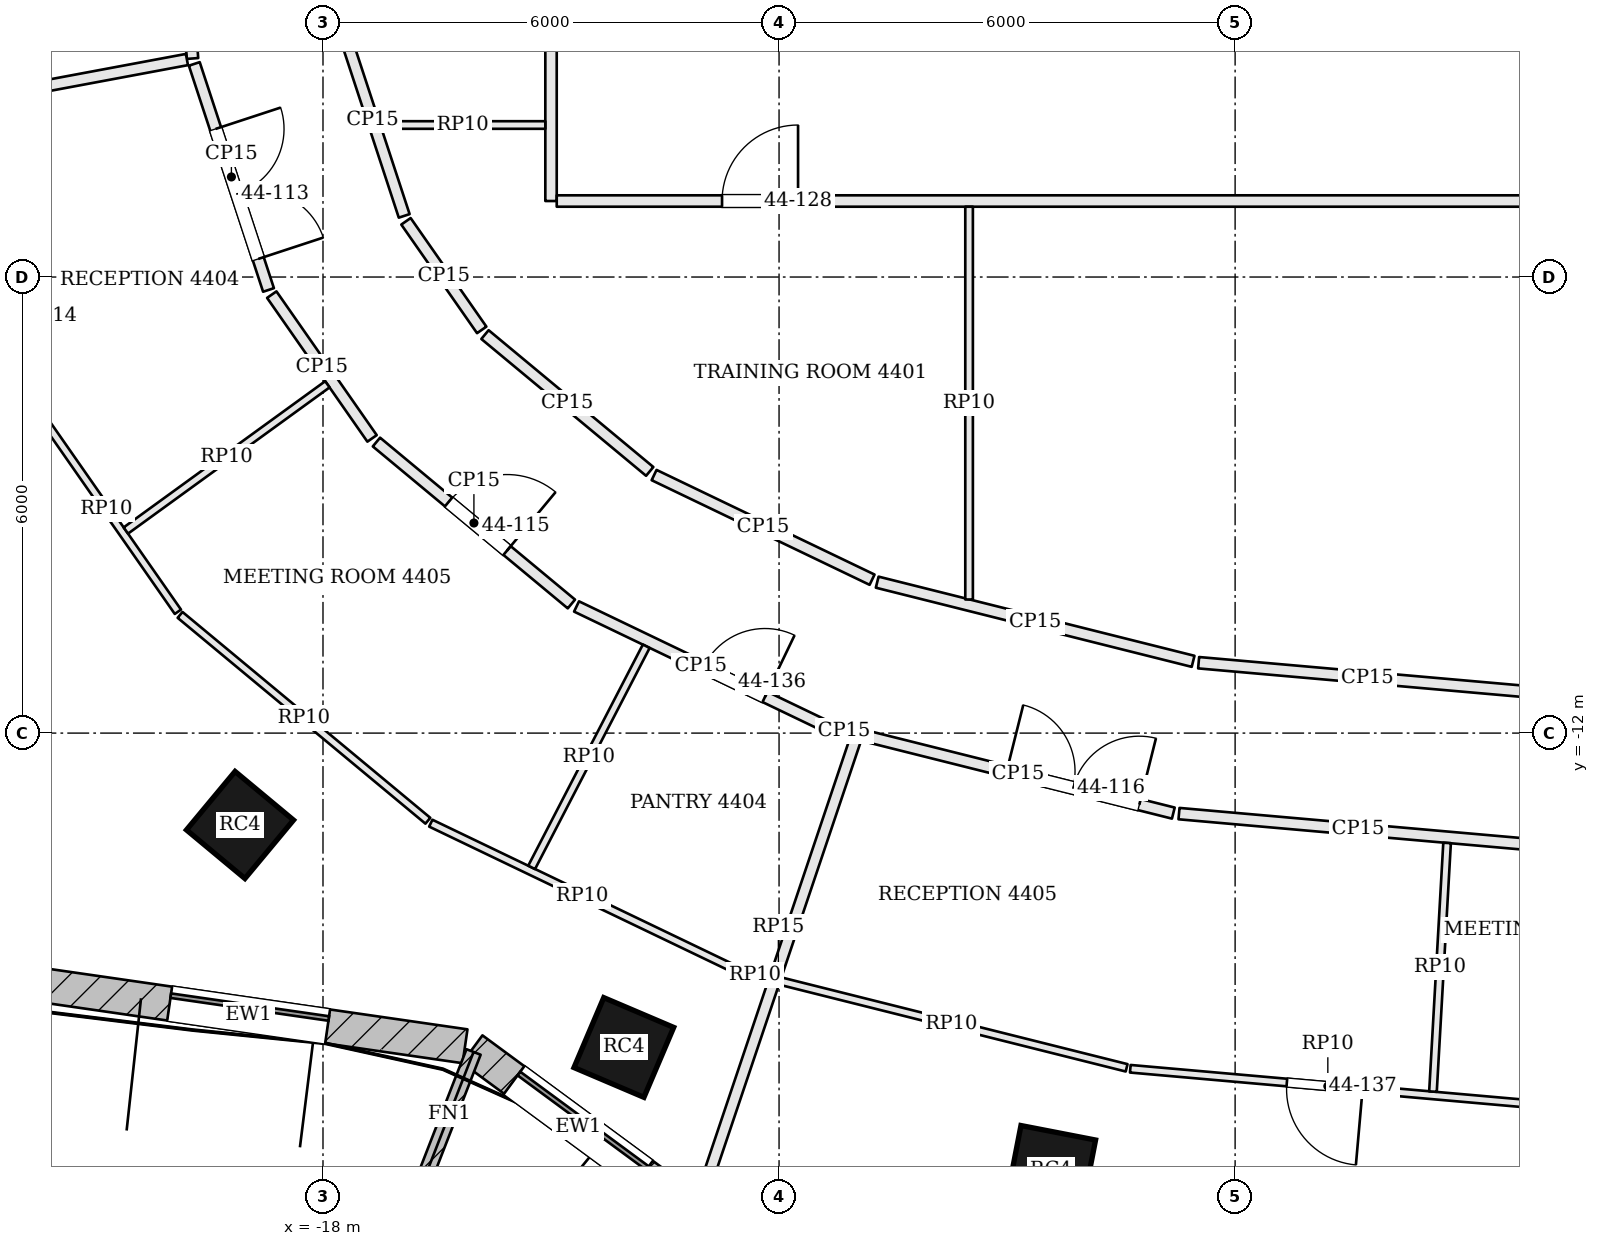
"""IFC4 building model, lengths in metres.
Left out: names, types, materials, properties, quantities, classifications, styles, units other than length and angle.
Written with IfcOpenShell. Run it as: python <this file> out.ifc"""

import sys

from ifc_helpers import new_model, si_unit, direction, frame, frame_2d, origin, origin_2d, place, context, subcontext, project, spatial, rectangle, extrude, element, fill, save


model = new_model("IFC4")
c1 = context("Model", 3, precision=1e-05, world=origin(), true_north=direction((0.0, 1.0)))
c2 = subcontext(c1, "Body", "Model", "MODEL_VIEW")
j1 = project(units=[si_unit("LENGTHUNIT", "METRE"), si_unit("PLANEANGLEUNIT", "RADIAN")], contexts=[c1])
p1 = place(None, origin())
s1 = spatial("IfcSite", under=j1, at=p1, CompositionType="ELEMENT")
p2 = place(p1, origin())
s2 = spatial("IfcBuilding", under=s1, at=p2, CompositionType="ELEMENT")
p3 = place(p2, frame((0.0, 0.0, 181.8)))
s3 = spatial("IfcBuildingStorey", under=s2, at=p3, CompositionType="ELEMENT", Elevation=181.8)
for number, where, z_axis, x_axis in (
    (1, (-19.092, -13.209, 0.0), (0.0, 0.0, 1.0), (0.769, -0.639, 0.0)),
    (2, (-14.042, -16.136, 0.0), (0.0, 0.0, 1.0), (0.92, -0.392, 0.0)),
    (3, (-8.422, -17.749, 0.0), (0.0, 0.0, 1.0), (0.982, -0.191, 0.0)),
):
    element("IfcColumn", number, at=place(p3, frame(where, z_axis=z_axis, x_axis=x_axis)), inside=s3, PredefinedType="COLUMN", context=c2, shape_type="SweptSolid", body=[
        extrude(rectangle(XDim=1.0, YDim=1.0, at=origin_2d()), origin(), (0.0, 0.0, 1.0), 3.9),
    ])
p4 = place(p3, frame((-21.825, -15.297, 0.0), z_axis=(0.0, 0.0, 1.0), x_axis=(0.98971474215, -0.143054986527, 0.0)))
e4 = element("IfcWall", 4, at=p4, inside=s3, PredefinedType="SOLIDWALL", context=c2, shape_type="SweptSolid", body=[
    extrude(rectangle(XDim=5.753, YDim=0.45, at=frame_2d((2.876, 0.0))), origin(), (0.0, 0.0, 1.0), 3.7),
])
p5 = place(p4, frame((1.826, 0.0, 0.9)))
e5 = element("IfcOpeningElement", 5, at=p5, cuts=e4, PredefinedType="OPENING", context=c2, shape_type="SweptSolid", body=[
    extrude(rectangle(XDim=2.1, YDim=2.3, at=frame_2d((1.05, 1.15))), frame((0.0, 0.235, 0.0), z_axis=(0.0, -1.0, 0.0), x_axis=(1.0, 0.0, 0.0)), (0.0, 0.0, 1.0), 0.47),
])
p6 = place(p3, frame((-16.036, -16.158, 0.0), z_axis=(0.0, 0.0, 1.0), x_axis=(0.805181432967, -0.593028549064, 0.0)))
e6 = element("IfcWall", 6, at=p6, inside=s3, PredefinedType="SOLIDWALL", context=c2, shape_type="SweptSolid", body=[
    extrude(rectangle(XDim=3.469, YDim=0.45, at=frame_2d((1.734, 0.0))), origin(), (0.0, 0.0, 1.0), 3.7),
])
p7 = place(p6, frame((0.684, 0.0, 0.9)))
e7 = element("IfcOpeningElement", 7, at=p7, cuts=e6, PredefinedType="OPENING", context=c2, shape_type="SweptSolid", body=[
    extrude(rectangle(XDim=2.1, YDim=2.3, at=frame_2d((1.05, 1.15))), frame((0.0, 0.235, 0.0), z_axis=(0.0, -1.0, 0.0), x_axis=(1.0, 0.0, 0.0)), (0.0, 0.0, 1.0), 0.47),
])
p8 = place(p3, frame((-16.019, -16.195, 0.0), z_axis=(0.0, 0.0, 1.0), x_axis=(-0.362641522028, -0.931928713208, 0.0)))
e8 = element("IfcWall", 8, at=p8, inside=s3, PredefinedType="SOLIDWALL", context=c2, shape_type="SweptSolid", body=[
    extrude(rectangle(XDim=1.75, YDim=0.2, at=frame_2d((0.875, 0.0))), origin(), (0.0, 0.0, 1.0), 3.7),
])
p9 = place(p3, frame((-19.943, -0.075, 0.0), z_axis=(0.0, 0.0, 1.0), x_axis=(0.074071611523, -0.997252924973, 0.0)))
e9 = element("IfcWall", 9, at=p9, inside=s3, PredefinedType="PARTITIONING", context=c2, shape_type="SweptSolid", body=[
    extrude(rectangle(XDim=3.059, YDim=0.15, at=frame_2d((1.529, 0.0))), origin(), (0.0, 0.0, 1.0), 3.084),
])
p10 = place(p9, frame((1.05, 0.0, 0.0)))
e10 = element("IfcOpeningElement", 10, at=p10, cuts=e9, PredefinedType="OPENING", context=c2, shape_type="SweptSolid", body=[
    extrude(rectangle(XDim=1.0, YDim=2.1, at=frame_2d((0.5, 1.05))), frame((0.0, 0.085, 0.0), z_axis=(0.0, -1.0, 0.0), x_axis=(1.0, 0.0, 0.0)), (0.0, 0.0, 1.0), 0.17),
])
p11 = place(p3, frame((-25.467, -4.199, 0.0), z_axis=(0.0, 0.0, 1.0), x_axis=(0.982998787258, 0.183612048216, 0.0)))
e11 = element("IfcWall", 11, at=p11, inside=s3, PredefinedType="PARTITIONING", context=c2, shape_type="SweptSolid", body=[
    extrude(rectangle(XDim=5.775, YDim=0.15, at=frame_2d((2.887, 0.0))), origin(), (0.0, 0.0, 1.0), 3.234),
])
p12 = place(p3, frame((-19.693, -3.196, 0.0), z_axis=(0.0, 0.0, 1.0), x_axis=(0.311918951318, -0.950108713679, 0.0)))
e12 = element("IfcWall", 12, at=p12, inside=s3, PredefinedType="PARTITIONING", context=c2, shape_type="SweptSolid", body=[
    extrude(rectangle(XDim=3.13, YDim=0.15, at=frame_2d((1.565, 0.0))), origin(), (0.0, 0.0, 1.0), 3.084),
])
p13 = place(p12, frame((0.9, 0.0, 0.0)))
e13 = element("IfcOpeningElement", 13, at=p13, cuts=e12, PredefinedType="OPENING", context=c2, shape_type="SweptSolid", body=[
    extrude(rectangle(XDim=1.8, YDim=2.1, at=frame_2d((0.9, 1.05))), frame((0.0, 0.085, 0.0), z_axis=(0.0, -1.0, 0.0), x_axis=(1.0, 0.0, 0.0)), (0.0, 0.0, 1.0), 0.17),
])
p14 = place(p3, frame((-18.674, -6.232, 0.0), z_axis=(0.0, 0.0, 1.0), x_axis=(0.572118665737, -0.820170855563, 0.0)))
e14 = element("IfcWall", 14, at=p14, inside=s3, PredefinedType="PARTITIONING", context=c2, shape_type="SweptSolid", body=[
    extrude(rectangle(XDim=2.306, YDim=0.15, at=frame_2d((1.153, 0.0))), origin(), (0.0, 0.0, 1.0), 3.084),
])
p15 = place(p3, frame((-17.297, -8.171, 0.0), z_axis=(0.0, 0.0, 1.0), x_axis=(0.769228575061, -0.638973707839, 0.0)))
e15 = element("IfcWall", 15, at=p15, inside=s3, PredefinedType="PARTITIONING", context=c2, shape_type="SweptSolid", body=[
    extrude(rectangle(XDim=3.334, YDim=0.15, at=frame_2d((1.667, 0.0))), origin(), (0.0, 0.0, 1.0), 3.084),
])
p16 = place(p15, frame((1.234, 0.0, 0.0)))
e16 = element("IfcOpeningElement", 16, at=p16, cuts=e15, PredefinedType="OPENING", context=c2, shape_type="SweptSolid", body=[
    extrude(rectangle(XDim=1.0, YDim=2.4, at=frame_2d((0.5, 1.2))), frame((0.0, 0.085, 0.0), z_axis=(0.0, -1.0, 0.0), x_axis=(1.0, 0.0, 0.0)), (0.0, 0.0, 1.0), 0.17),
])
p17 = place(p3, frame((-14.664, -10.334, 0.0), z_axis=(0.0, 0.0, 1.0), x_axis=(0.901507315282, -0.432763862278, 0.0)))
e17 = element("IfcWall", 17, at=p17, inside=s3, PredefinedType="PARTITIONING", context=c2, shape_type="SweptSolid", body=[
    extrude(rectangle(XDim=3.63, YDim=0.15, at=frame_2d((1.815, 0.0))), origin(), (0.0, 0.0, 1.0), 3.084),
])
p18 = place(p17, frame((1.85, 0.0, 0.0)))
e18 = element("IfcOpeningElement", 18, at=p18, cuts=e17, PredefinedType="OPENING", context=c2, shape_type="SweptSolid", body=[
    extrude(rectangle(XDim=0.9, YDim=2.1, at=frame_2d((0.45, 1.05))), frame((0.0, 0.085, 0.0), z_axis=(0.0, -1.0, 0.0), x_axis=(1.0, 0.0, 0.0)), (0.0, 0.0, 1.0), 0.17),
])
p19 = place(p3, frame((-11.319, -11.923, 0.0), z_axis=(0.0, 0.0, 1.0), x_axis=(0.969942256681, -0.243335198242, 0.0)))
e19 = element("IfcWall", 19, at=p19, inside=s3, PredefinedType="PARTITIONING", context=c2, shape_type="SweptSolid", body=[
    extrude(rectangle(XDim=0.359, YDim=0.15, at=frame_2d((0.18, 0.0))), origin(), (0.0, 0.0, 1.0), 3.084),
])
p20 = place(p3, frame((-13.024, -18.112, 0.0), z_axis=(0.0, 0.0, 1.0), x_axis=(0.319081027508, 0.947727438605, 0.0)))
e20 = element("IfcWall", 20, at=p20, inside=s3, PredefinedType="PARTITIONING", context=c2, shape_type="SweptSolid", body=[
    extrude(rectangle(XDim=6.363, YDim=0.15, at=frame_2d((3.181, 0.0))), origin(), (0.0, 0.0, 1.0), 3.234),
])
p21 = place(p3, frame((-10.897, -12.029, 0.0), z_axis=(0.0, 0.0, 1.0), x_axis=(0.969999087169, -0.24310855783, 0.0)))
e21 = element("IfcWall", 21, at=p21, inside=s3, PredefinedType="PARTITIONING", context=c2, shape_type="SweptSolid", body=[
    extrude(rectangle(XDim=4.211, YDim=0.15, at=frame_2d((2.105, 0.0))), origin(), (0.0, 0.0, 1.0), 3.084),
])
p22 = place(p21, frame((1.95, 0.0, 0.0)))
e22 = element("IfcOpeningElement", 22, at=p22, cuts=e21, PredefinedType="OPENING", context=c2, shape_type="SweptSolid", body=[
    extrude(rectangle(XDim=1.8, YDim=2.1, at=frame_2d((0.9, 1.05))), frame((0.0, 0.085, 0.0), z_axis=(0.0, -1.0, 0.0), x_axis=(1.0, 0.0, 0.0)), (0.0, 0.0, 1.0), 0.17),
])
p23 = place(p3, frame((-6.738, -13.059, 0.0), z_axis=(0.0, 0.0, 1.0), x_axis=(0.996143527037, -0.087738666181, 0.0)))
e23 = element("IfcWall", 23, at=p23, inside=s3, PredefinedType="PARTITIONING", context=c2, shape_type="SweptSolid", body=[
    extrude(rectangle(XDim=4.73, YDim=0.15, at=frame_2d((2.365, 0.0))), origin(), (0.0, 0.0, 1.0), 3.084),
])
p24 = place(p3, frame((-2.039, -11.465, 0.0), z_axis=(0.0, 0.0, 1.0), x_axis=(-0.996139855484, 0.087780341286, 0.0)))
e24 = element("IfcWall", 24, at=p24, inside=s3, PredefinedType="PARTITIONING", context=c2, shape_type="SweptSolid", body=[
    extrude(rectangle(XDim=4.458, YDim=0.15, at=frame_2d((2.229, 0.0))), origin(), (0.0, 0.0, 1.0), 3.084),
])
p25 = place(p3, frame((-6.553, -11.056, 0.0), z_axis=(0.0, 0.0, 1.0), x_axis=(-0.970004917182, 0.243085294995, 0.0)))
e25 = element("IfcWall", 25, at=p25, inside=s3, PredefinedType="PARTITIONING", context=c2, shape_type="SweptSolid", body=[
    extrude(rectangle(XDim=4.284, YDim=0.15, at=frame_2d((2.142, 0.0))), origin(), (0.0, 0.0, 1.0), 3.084),
])
p26 = place(p3, frame((-10.776, -9.982, 0.0), z_axis=(0.0, 0.0, 1.0), x_axis=(-0.901511079436, 0.432756020933, 0.0)))
e26 = element("IfcWall", 26, at=p26, inside=s3, PredefinedType="PARTITIONING", context=c2, shape_type="SweptSolid", body=[
    extrude(rectangle(XDim=3.181, YDim=0.15, at=frame_2d((1.59, 0.0))), origin(), (0.0, 0.0, 1.0), 3.084),
])
p27 = place(p3, frame((-13.702, -8.557, 0.0), z_axis=(0.0, 0.0, 1.0), x_axis=(-0.769221825067, 0.638981833733, 0.0)))
e27 = element("IfcWall", 27, at=p27, inside=s3, PredefinedType="PARTITIONING", context=c2, shape_type="SweptSolid", body=[
    extrude(rectangle(XDim=2.817, YDim=0.15, at=frame_2d((1.409, 0.0))), origin(), (0.0, 0.0, 1.0), 3.084),
])
p28 = place(p3, frame((-15.912, -6.696, 0.0), z_axis=(0.0, 0.0, 1.0), x_axis=(-0.572078533763, 0.820198848578, 0.0)))
e28 = element("IfcWall", 28, at=p28, inside=s3, PredefinedType="PARTITIONING", context=c2, shape_type="SweptSolid", body=[
    extrude(rectangle(XDim=1.742, YDim=0.15, at=frame_2d((0.871, 0.0))), origin(), (0.0, 0.0, 1.0), 3.084),
])
p29 = place(p3, frame((-16.932, -5.196, 0.0), z_axis=(0.0, 0.0, 1.0), x_axis=(-0.311904957484, 0.950113307715, 0.0)))
e29 = element("IfcWall", 29, at=p29, inside=s3, PredefinedType="PARTITIONING", context=c2, shape_type="SweptSolid", body=[
    extrude(rectangle(XDim=2.662, YDim=0.15, at=frame_2d((1.331, 0.0))), origin(), (0.0, 0.0, 1.0), 3.084),
])
p30 = place(p3, frame((-15.0, 7.423, 0.0), z_axis=(0.0, 0.0, 1.0), x_axis=(0.0, -1.0, 0.0)))
e30 = element("IfcWall", 30, at=p30, inside=s3, PredefinedType="PARTITIONING", context=c2, shape_type="SweptSolid", body=[
    extrude(rectangle(XDim=12.423, YDim=0.15, at=frame_2d((6.211, 0.0))), origin(), (0.0, 0.0, 1.0), 3.084),
])
p31 = place(p30, frame((5.174, 0.0, 0.0)))
e31 = element("IfcOpeningElement", 31, at=p31, cuts=e30, PredefinedType="OPENING", context=c2, shape_type="SweptSolid", body=[
    extrude(rectangle(XDim=1.0, YDim=2.1, at=frame_2d((0.5, 1.05))), frame((0.0, 0.085, 0.0), z_axis=(0.0, -1.0, 0.0), x_axis=(1.0, 0.0, 0.0)), (0.0, 0.0, 1.0), 0.17),
])
p32 = place(p3, frame((-14.925, -5.0, 0.0), z_axis=(0.0, 0.0, 1.0), x_axis=(1.0, 0.0, 0.0)))
e32 = element("IfcWall", 32, at=p32, inside=s3, PredefinedType="PARTITIONING", context=c2, shape_type="SweptSolid", body=[
    extrude(rectangle(XDim=29.925, YDim=0.15, at=frame_2d((14.962, 0.0))), origin(), (0.0, 0.0, 1.0), 3.084),
])
p33 = place(p32, frame((2.175, 0.0, 0.0)))
e33 = element("IfcOpeningElement", 33, at=p33, cuts=e32, PredefinedType="OPENING", context=c2, shape_type="SweptSolid", body=[
    extrude(rectangle(XDim=1.0, YDim=2.1, at=frame_2d((0.5, 1.05))), frame((0.0, 0.085, 0.0), z_axis=(0.0, -1.0, 0.0), x_axis=(1.0, 0.0, 0.0)), (0.0, 0.0, 1.0), 0.17),
])
p34 = place(p32, frame((14.025, 0.0, 0.0)))
e34 = element("IfcOpeningElement", 34, at=p34, cuts=e32, PredefinedType="OPENING", context=c2, shape_type="SweptSolid", body=[
    extrude(rectangle(XDim=1.8, YDim=2.1, at=frame_2d((0.9, 1.05))), frame((0.0, 0.085, 0.0), z_axis=(0.0, -1.0, 0.0), x_axis=(1.0, 0.0, 0.0)), (0.0, 0.0, 1.0), 0.17),
])
p35 = place(p32, frame((26.675, 0.0, 0.0)))
e35 = element("IfcOpeningElement", 35, at=p35, cuts=e32, PredefinedType="OPENING", context=c2, shape_type="SweptSolid", body=[
    extrude(rectangle(XDim=1.0, YDim=2.1, at=frame_2d((0.5, 1.05))), frame((0.0, 0.085, 0.0), z_axis=(0.0, -1.0, 0.0), x_axis=(1.0, 0.0, 0.0)), (0.0, 0.0, 1.0), 0.17),
])
p36 = place(p3, frame((-12.078, -15.238, 0.0), z_axis=(0.0, 0.0, 1.0), x_axis=(-0.970024978464, 0.243005228658, 0.0)))
e36 = element("IfcWall", 36, at=p36, inside=s3, PredefinedType="PARTITIONING", context=c2, shape_type="SweptSolid", body=[
    extrude(rectangle(XDim=0.489, YDim=0.1, at=frame_2d((0.245, 0.0))), origin(), (0.0, 0.0, 1.0), 3.084),
])
p37 = place(p3, frame((-12.597, -15.098, 0.0), z_axis=(0.0, 0.0, 1.0), x_axis=(-0.901514437286, 0.432749025839, 0.0)))
e37 = element("IfcWall", 37, at=p37, inside=s3, PredefinedType="PARTITIONING", context=c2, shape_type="SweptSolid", body=[
    extrude(rectangle(XDim=4.42, YDim=0.1, at=frame_2d((2.21, 0.0))), origin(), (0.0, 0.0, 1.0), 3.084),
])
p38 = place(p3, frame((-16.62, -13.153, 0.0), z_axis=(0.0, 0.0, 1.0), x_axis=(-0.76922129881, 0.638982467253, 0.0)))
e38 = element("IfcWall", 38, at=p38, inside=s3, PredefinedType="PARTITIONING", context=c2, shape_type="SweptSolid", body=[
    extrude(rectangle(XDim=4.238, YDim=0.1, at=frame_2d((2.119, 0.0))), origin(), (0.0, 0.0, 1.0), 3.084),
])
p39 = place(p3, frame((-19.909, -10.404, 0.0), z_axis=(0.0, 0.0, 1.0), x_axis=(-0.572111951901, 0.820175538828, 0.0)))
e39 = element("IfcWall", 39, at=p39, inside=s3, PredefinedType="PARTITIONING", context=c2, shape_type="SweptSolid", body=[
    extrude(rectangle(XDim=3.29, YDim=0.1, at=frame_2d((1.645, 0.0))), origin(), (0.0, 0.0, 1.0), 3.084),
])
p40 = place(p3, frame((-17.942, -7.412, 0.0), z_axis=(0.0, 0.0, 1.0), x_axis=(-0.809425321456, -0.587222827372, 0.0)))
e40 = element("IfcWall", 40, at=p40, inside=s3, PredefinedType="PARTITIONING", context=c2, shape_type="SweptSolid", body=[
    extrude(rectangle(XDim=3.275, YDim=0.1, at=frame_2d((1.638, 0.0))), origin(), (0.0, 0.0, 1.0), 3.084),
])
p41 = place(p3, frame((-13.747, -10.857, 0.0), z_axis=(0.0, 0.0, 1.0), x_axis=(-0.460160569956, -0.887835711074, 0.0)))
e41 = element("IfcWall", 41, at=p41, inside=s3, PredefinedType="PARTITIONING", context=c2, shape_type="SweptSolid", body=[
    extrude(rectangle(XDim=3.277, YDim=0.1, at=frame_2d((1.638, 0.0))), origin(), (0.0, 0.0, 1.0), 3.084),
])
p42 = place(p3, frame((-2.181, -16.874, 0.0), z_axis=(0.0, 0.0, 1.0), x_axis=(-0.996143934904, 0.087734035321, 0.0)))
e42 = element("IfcWall", 42, at=p42, inside=s3, PredefinedType="PARTITIONING", context=c2, shape_type="SweptSolid", body=[
    extrude(rectangle(XDim=5.218, YDim=0.1, at=frame_2d((2.609, 0.0))), origin(), (0.0, 0.0, 1.0), 3.084),
])
p43 = place(p42, frame((2.15, 0.0, 0.0)))
e43 = element("IfcOpeningElement", 43, at=p43, cuts=e42, PredefinedType="OPENING", context=c2, shape_type="SweptSolid", body=[
    extrude(rectangle(XDim=1.0, YDim=2.1, at=frame_2d((0.5, 1.05))), frame((0.0, 0.06, 0.0), z_axis=(0.0, -1.0, 0.0), x_axis=(1.0, 0.0, 0.0)), (0.0, 0.0, 1.0), 0.12),
])
p44 = place(p3, frame((-7.427, -16.404, 0.0), z_axis=(0.0, 0.0, 1.0), x_axis=(-0.970009433409, 0.243067272783, 0.0)))
e44 = element("IfcWall", 44, at=p44, inside=s3, PredefinedType="PARTITIONING", context=c2, shape_type="SweptSolid", body=[
    extrude(rectangle(XDim=4.754, YDim=0.1, at=frame_2d((2.377, 0.0))), origin(), (0.0, 0.0, 1.0), 3.084),
])
p45 = place(p3, frame((-3.211, -13.445, 0.0), z_axis=(0.0, 0.0, 1.0), x_axis=(-0.056703901856, -0.99839103938, 0.0)))
e45 = element("IfcWall", 45, at=p45, inside=s3, PredefinedType="PARTITIONING", context=c2, shape_type="SweptSolid", body=[
    extrude(rectangle(XDim=3.277, YDim=0.1, at=frame_2d((1.638, 0.0))), origin(), (0.0, 0.0, 1.0), 3.084),
])
p46 = place(p3, frame((-9.5, -10.242, 0.0), z_axis=(0.0, 0.0, 1.0), x_axis=(0.0, 1.0, 0.0)))
e46 = element("IfcWall", 46, at=p46, inside=s3, PredefinedType="PARTITIONING", context=c2, shape_type="SweptSolid", body=[
    extrude(rectangle(XDim=5.167, YDim=0.1, at=frame_2d((2.583, 0.0))), origin(), (0.0, 0.0, 1.0), 3.084),
])
p47 = place(p3, frame((-17.249, -4.0, 0.0), z_axis=(0.0, 0.0, 1.0), x_axis=(1.0, 0.0, 0.0)))
e47 = element("IfcWall", 47, at=p47, inside=s3, PredefinedType="PARTITIONING", context=c2, shape_type="SweptSolid", body=[
    extrude(rectangle(XDim=2.174, YDim=0.1, at=frame_2d((1.087, 0.0))), origin(), (0.0, 0.0, 1.0), 3.084),
])
p48 = place(p5, origin())
e48 = element("IfcWindow", 48, at=p48, inside=s3, PartitioningType="SINGLE_PANEL", PredefinedType="WINDOW", context=c2, shape_type="SweptSolid", body=[
    extrude(rectangle(XDim=2.1, YDim=2.3, at=frame_2d((1.05, 1.15))), frame((0.0, 0.135, 0.0), z_axis=(0.0, -1.0, 0.0), x_axis=(1.0, 0.0, 0.0)), (0.0, 0.0, 1.0), 0.06),
])
fill(e5, e48)
p49 = place(p7, origin())
e49 = element("IfcWindow", 49, at=p49, inside=s3, PartitioningType="SINGLE_PANEL", PredefinedType="WINDOW", context=c2, shape_type="SweptSolid", body=[
    extrude(rectangle(XDim=2.1, YDim=2.3, at=frame_2d((1.05, 1.15))), frame((0.0, 0.135, 0.0), z_axis=(0.0, -1.0, 0.0), x_axis=(1.0, 0.0, 0.0)), (0.0, 0.0, 1.0), 0.06),
])
fill(e7, e49)
p50 = place(p13, origin())
e50 = element("IfcDoor", 50, at=p50, inside=s3, OperationType="DOUBLE_DOOR_SINGLE_SWING", PredefinedType="DOOR", context=c2, shape_type="SweptSolid", body=[
    extrude(rectangle(XDim=1.8, YDim=2.1, at=frame_2d((0.9, 1.05))), frame((0.0, 0.025, 0.0), z_axis=(0.0, -1.0, 0.0), x_axis=(1.0, 0.0, 0.0)), (0.0, 0.0, 1.0), 0.05),
])
fill(e13, e50)
p51 = place(p16, origin())
e51 = element("IfcDoor", 51, at=p51, inside=s3, OperationType="SINGLE_SWING_RIGHT", PredefinedType="DOOR", context=c2, shape_type="SweptSolid", body=[
    extrude(rectangle(XDim=1.0, YDim=2.4, at=frame_2d((0.5, 1.2))), frame((0.0, 0.025, 0.0), z_axis=(0.0, -1.0, 0.0), x_axis=(1.0, 0.0, 0.0)), (0.0, 0.0, 1.0), 0.05),
])
fill(e16, e51)
p52 = place(p22, origin())
e52 = element("IfcDoor", 52, at=p52, inside=s3, OperationType="DOUBLE_DOOR_SINGLE_SWING", PredefinedType="DOOR", context=c2, shape_type="SweptSolid", body=[
    extrude(rectangle(XDim=1.8, YDim=2.1, at=frame_2d((0.9, 1.05))), frame((0.0, 0.025, 0.0), z_axis=(0.0, -1.0, 0.0), x_axis=(1.0, 0.0, 0.0)), (0.0, 0.0, 1.0), 0.05),
])
fill(e22, e52)
p53 = place(p33, origin())
e53 = element("IfcDoor", 53, at=p53, inside=s3, OperationType="SINGLE_SWING_RIGHT", PredefinedType="DOOR", context=c2, shape_type="SweptSolid", body=[
    extrude(rectangle(XDim=1.0, YDim=2.1, at=frame_2d((0.5, 1.05))), frame((0.0, 0.025, 0.0), z_axis=(0.0, -1.0, 0.0), x_axis=(1.0, 0.0, 0.0)), (0.0, 0.0, 1.0), 0.05),
])
fill(e33, e53)
p54 = place(p18, origin())
e54 = element("IfcDoor", 54, at=p54, inside=s3, OperationType="SINGLE_SWING_RIGHT", PredefinedType="DOOR", context=c2, shape_type="SweptSolid", body=[
    extrude(rectangle(XDim=0.9, YDim=2.1, at=frame_2d((0.45, 1.05))), frame((0.0, 0.025, 0.0), z_axis=(0.0, -1.0, 0.0), x_axis=(1.0, 0.0, 0.0)), (0.0, 0.0, 1.0), 0.05),
])
fill(e18, e54)
p55 = place(p43, origin())
e55 = element("IfcDoor", 55, at=p55, inside=s3, OperationType="SINGLE_SWING_LEFT", PredefinedType="DOOR", context=c2, shape_type="SweptSolid", body=[
    extrude(rectangle(XDim=1.0, YDim=2.1, at=frame_2d((0.5, 1.05))), frame((0.0, 0.025, 0.0), z_axis=(0.0, -1.0, 0.0), x_axis=(1.0, 0.0, 0.0)), (0.0, 0.0, 1.0), 0.05),
])
fill(e43, e55)
save(model, sys.argv[1])
